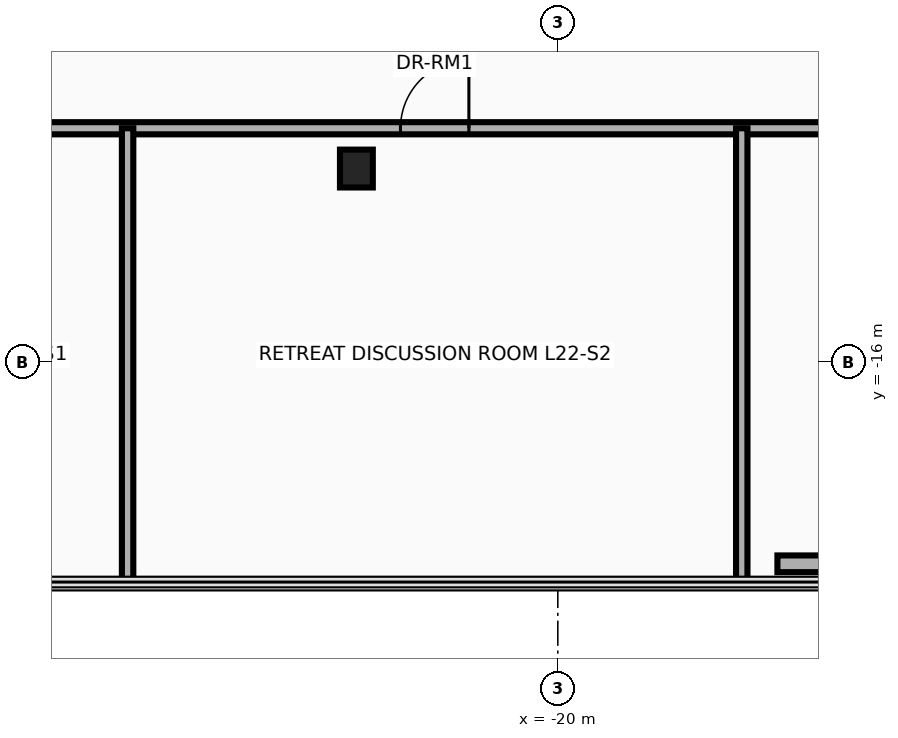
"""IFC4 building model, lengths in metres.
Left out: names, types, materials, properties, quantities, classifications, styles, units other than length and angle.
Written with IfcOpenShell. Run it as: python <this file> out.ifc"""

import sys

from ifc_helpers import new_model, si_unit, direction, frame, frame_2d, origin, origin_2d, place, context, subcontext, project, spatial, rectangle, i_section, extrude, source, transform, mapped, element, fill, save


model = new_model("IFC4")
c1 = context("Model", 3, precision=1e-05, world=origin(), true_north=direction((0.0, 1.0)))
c2 = subcontext(c1, "Body", "Model", "MODEL_VIEW")
j1 = project(units=[si_unit("LENGTHUNIT", "METRE"), si_unit("PLANEANGLEUNIT", "RADIAN")], contexts=[c1])
p1 = place(None, origin())
s1 = spatial("IfcSite", under=j1, at=p1, CompositionType="ELEMENT")
p2 = place(p1, origin())
s2 = spatial("IfcBuilding", under=s1, at=p2, CompositionType="ELEMENT")
p3 = place(p2, frame((0.0, 0.0, 88.9)))
s3 = spatial("IfcBuildingStorey", under=s2, at=p3, CompositionType="ELEMENT", Elevation=88.9)
m1 = source(origin(), c2, "Body", "SweptSolid", [
    extrude(i_section(OverallWidth=0.432, OverallDepth=0.498, WebThickness=0.056, FlangeThickness=0.089, at=origin_2d()), origin(), (0.0, 0.0, 1.0), 3.7),
])
p4 = place(p3, frame((-22.65, -13.45, 0.0), z_axis=(0.0, 0.0, 1.0), x_axis=(1.0, 0.0, 0.0)))
e1 = element("IfcColumn", 1, at=p4, inside=s3, PredefinedType="COLUMN", context=c2, shape_type="MappedRepresentation", body=[
    mapped(m1, transform((0.0, 0.0, 0.0), x_axis=(1.0, 0.0, 0.0), y_axis=(0.0, 1.0, 0.0), z_axis=(0.0, 0.0, 1.0), scale=1.0)),
])
p5 = place(p3, frame((-14.911, -18.65, 0.0), z_axis=(0.0, 0.0, 1.0), x_axis=(-1.0, 0.0, 0.0)))
e2 = element("IfcWall", 2, at=p5, inside=s3, PredefinedType="SOLIDWALL", context=c2, shape_type="SweptSolid", body=[
    extrude(rectangle(XDim=2.2, YDim=0.22, at=frame_2d((1.1, 0.0))), origin(), (0.0, 0.0, 1.0), 3.46),
])
p6 = place(p5, frame((0.65, 0.0, 0.95)))
e3 = element("IfcOpeningElement", 3, at=p6, cuts=e2, PredefinedType="OPENING", context=c2, shape_type="SweptSolid", body=[
    extrude(rectangle(XDim=0.9, YDim=1.3, at=frame_2d((0.45, 0.65))), frame((0.0, 0.125, 0.0), z_axis=(0.0, -1.0, 0.0), x_axis=(1.0, 0.0, 0.0)), (0.0, 0.0, 1.0), 0.25),
])
p7 = place(p3, frame((-31.89, -12.92, 0.0), z_axis=(0.0, 0.0, 1.0), x_axis=(1.0, 0.0, 0.0)))
e4 = element("IfcWall", 4, at=p7, inside=s3, PredefinedType="PARTITIONING", context=c2, shape_type="SweptSolid", body=[
    extrude(rectangle(XDim=22.28, YDim=0.16, at=frame_2d((11.14, 0.0))), origin(), (0.0, 0.0, 1.0), 2.834),
])
p8 = place(p7, frame((2.665, 0.0, 0.0)))
e5 = element("IfcOpeningElement", 5, at=p8, cuts=e4, PredefinedType="OPENING", context=c2, shape_type="SweptSolid", body=[
    extrude(rectangle(XDim=0.9, YDim=2.1, at=frame_2d((0.45, 1.05))), frame((0.0, 0.095, 0.0), z_axis=(0.0, -1.0, 0.0), x_axis=(1.0, 0.0, 0.0)), (0.0, 0.0, 1.0), 0.19),
])
p9 = place(p7, frame((9.82, 0.0, 0.0)))
e6 = element("IfcOpeningElement", 6, at=p9, cuts=e4, PredefinedType="OPENING", context=c2, shape_type="SweptSolid", body=[
    extrude(rectangle(XDim=0.9, YDim=2.1, at=frame_2d((0.45, 1.05))), frame((0.0, 0.095, 0.0), z_axis=(0.0, -1.0, 0.0), x_axis=(1.0, 0.0, 0.0)), (0.0, 0.0, 1.0), 0.19),
])
p10 = place(p7, frame((17.845, 0.0, 0.0)))
e7 = element("IfcOpeningElement", 7, at=p10, cuts=e4, PredefinedType="OPENING", context=c2, shape_type="SweptSolid", body=[
    extrude(rectangle(XDim=0.9, YDim=2.1, at=frame_2d((0.45, 1.05))), frame((0.0, 0.095, 0.0), z_axis=(0.0, -1.0, 0.0), x_axis=(1.0, 0.0, 0.0)), (0.0, 0.0, 1.0), 0.19),
])
p11 = place(p3, frame((-25.66, -18.89, 0.0), z_axis=(0.0, 0.0, 1.0), x_axis=(0.0, 1.0, 0.0)))
e8 = element("IfcWall", 8, at=p11, inside=s3, PredefinedType="PARTITIONING", context=c2, shape_type="SweptSolid", body=[
    extrude(rectangle(XDim=5.97, YDim=0.15, at=frame_2d((2.985, 0.0))), origin(), (0.0, 0.0, 1.0), 3.46),
])
p12 = place(p3, frame((-17.58, -18.89, 0.0), z_axis=(0.0, 0.0, 1.0), x_axis=(0.0, 1.0, 0.0)))
e9 = element("IfcWall", 9, at=p12, inside=s3, PredefinedType="PARTITIONING", context=c2, shape_type="SweptSolid", body=[
    extrude(rectangle(XDim=5.97, YDim=0.15, at=frame_2d((2.985, 0.0))), origin(), (0.0, 0.0, 1.0), 2.896),
])
p13 = place(p9, origin())
e10 = element("IfcDoor", 10, at=p13, inside=s3, OperationType="SINGLE_SWING_RIGHT", PredefinedType="DOOR", context=c2, shape_type="SweptSolid", body=[
    extrude(rectangle(XDim=0.9, YDim=2.1, at=frame_2d((0.45, 1.05))), frame((0.0, 0.025, 0.0), z_axis=(0.0, -1.0, 0.0), x_axis=(1.0, 0.0, 0.0)), (0.0, 0.0, 1.0), 0.05),
])
fill(e6, e10)
save(model, sys.argv[1])
